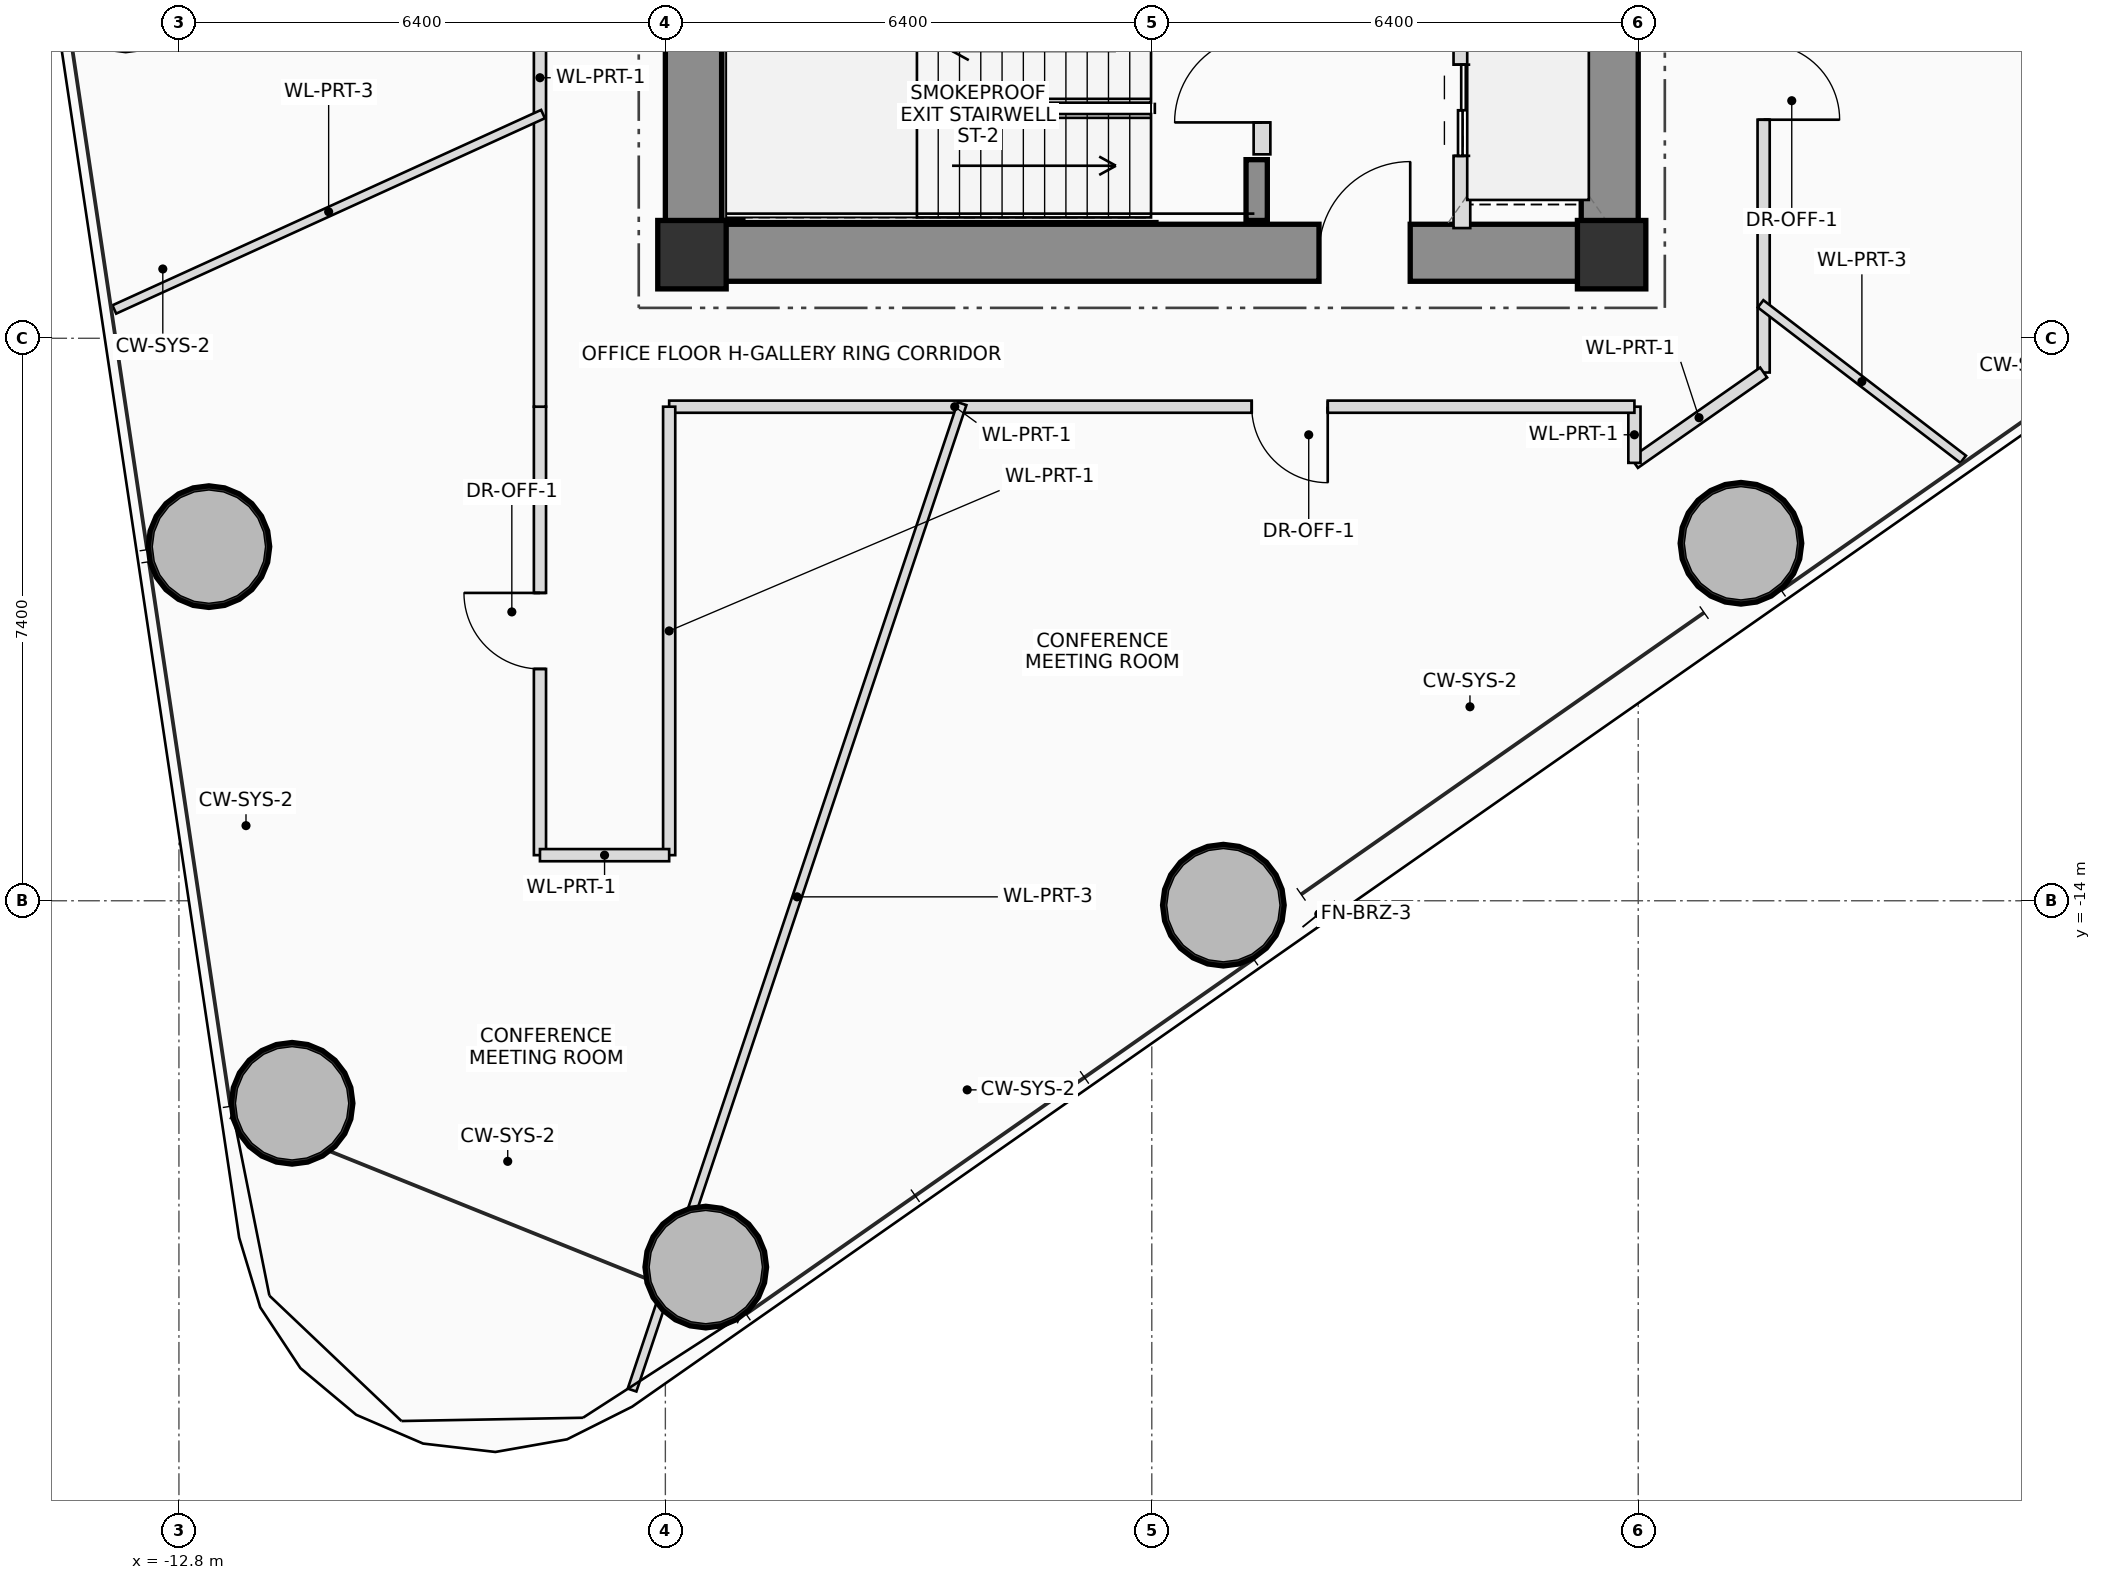
"""IFC4 building model, lengths in metres.
Left out: names, types, materials, properties, quantities, classifications, styles, units other than length and angle.
Written with IfcOpenShell. Run it as: python <this file> out.ifc"""

import sys

from ifc_helpers import new_model, si_unit, direction, frame, frame_2d, origin, origin_2d, place, context, subcontext, project, spatial, rectangle, hollow_circle, extrude, source, transform, mapped, element, fill, save


model = new_model("IFC4")
c1 = context("Model", 3, precision=1e-05, world=origin(), true_north=direction((0.0, 1.0)))
c2 = subcontext(c1, "Body", "Model", "MODEL_VIEW")
j1 = project(units=[si_unit("LENGTHUNIT", "METRE"), si_unit("PLANEANGLEUNIT", "RADIAN")], contexts=[c1])
p1 = place(None, origin())
s1 = spatial("IfcSite", under=j1, at=p1, CompositionType="ELEMENT")
p2 = place(p1, origin())
s2 = spatial("IfcBuilding", under=s1, at=p2, CompositionType="ELEMENT")
p3 = place(p2, frame((0.0, 0.0, 62.3)))
s3 = spatial("IfcBuildingStorey", under=s2, at=p3, CompositionType="ELEMENT", Elevation=62.3)
m1 = source(origin(), c2, "Body", "SweptSolid", [
    extrude(rectangle(XDim=0.9, YDim=0.9, at=origin_2d()), origin(), (0.0, 0.0, 1.0), 3.75),
])
for number, where, z_axis, x_axis in (
    (1, (-6.05, -5.5, 0.0), (0.0, 0.0, 1.0), (1.0, 0.0, 0.0)),
    (2, (6.05, -5.5, 0.0), (0.0, 0.0, 1.0), (1.0, 0.0, 0.0)),
):
    element("IfcColumn", number, at=place(p3, frame(where, z_axis=z_axis, x_axis=x_axis)), inside=s3, PredefinedType="COLUMN", context=c2, shape_type="MappedRepresentation", body=[
        mapped(m1, transform((0.0, 0.0, 0.0), scale=1.0)),
    ])
p4 = place(p3, frame((-6.4, -5.475, 0.0), z_axis=(0.0, 0.0, 1.0), x_axis=(1.0, 0.0, 0.0)))
e3 = element("IfcWall", 3, at=p4, inside=s3, PredefinedType="SHEAR", context=c2, shape_type="SweptSolid", body=[
    extrude(rectangle(XDim=12.8, YDim=0.75, at=frame_2d((6.4, 0.0))), origin(), (0.0, 0.0, 1.0), 3.75),
])
p5 = place(p4, frame((8.6, 0.0, 0.0)))
e4 = element("IfcOpeningElement", 4, at=p5, cuts=e3, PredefinedType="OPENING", context=c2, shape_type="SweptSolid", body=[
    extrude(rectangle(XDim=1.2, YDim=2.2, at=frame_2d((0.6, 1.1))), frame((0.0, 0.385, 0.0), z_axis=(0.0, -1.0, 0.0), x_axis=(1.0, 0.0, 0.0)), (0.0, 0.0, 1.0), 0.77),
])
p6 = place(p3, frame((6.025, -5.1, 0.0), z_axis=(0.0, 0.0, 1.0), x_axis=(0.0, 1.0, 0.0)))
e5 = element("IfcWall", 5, at=p6, inside=s3, PredefinedType="SHEAR", context=c2, shape_type="SweptSolid", body=[
    extrude(rectangle(XDim=10.2, YDim=0.75, at=frame_2d((5.1, 0.0))), origin(), (0.0, 0.0, 1.0), 3.75),
])
p7 = place(p3, frame((-6.025, -5.1, 0.0), z_axis=(0.0, 0.0, 1.0), x_axis=(0.0, 1.0, 0.0)))
e6 = element("IfcWall", 6, at=p7, inside=s3, PredefinedType="SHEAR", context=c2, shape_type="SweptSolid", body=[
    extrude(rectangle(XDim=3.35, YDim=0.75, at=frame_2d((1.675, 0.0))), origin(), (0.0, 0.0, 1.0), 3.75),
])
p8 = place(p3, frame((-5.52, -5.05, 0.0), z_axis=(0.0, 0.0, 1.0), x_axis=(0.0, 1.0, 0.0)))
e7 = element("IfcWall", 7, at=p8, inside=s3, PredefinedType="SHEAR", context=c2, shape_type="SweptSolid", body=[
    extrude(rectangle(XDim=2.75, YDim=0.28, at=frame_2d((1.375, 0.0))), origin(), (0.0, 0.0, 1.0), 3.75),
])
p9 = place(p3, frame((1.38, -5.05, 0.0), z_axis=(0.0, 0.0, 1.0), x_axis=(0.0, 1.0, 0.0)))
e8 = element("IfcWall", 8, at=p9, inside=s3, PredefinedType="SHEAR", context=c2, shape_type="SweptSolid", body=[
    extrude(rectangle(XDim=0.8, YDim=0.28, at=frame_2d((0.4, 0.0))), origin(), (0.0, 0.0, 1.0), 3.75),
])
m2 = source(origin(), c2, "Body", "SweptSolid", [
    extrude(hollow_circle(Radius=0.8, WallThickness=0.055, at=origin_2d()), origin(), (0.0, 0.0, 1.0), 3.75),
])
for number, where, z_axis, x_axis in (
    (9, (-5.868, -18.819, 0.0), (0.0, 0.0, 1.0), (1.0, 0.0, 0.0)),
    (10, (0.942, -14.058, 0.0), (0.0, 0.0, 1.0), (1.0, 0.0, 0.0)),
    (11, (7.752, -9.297, 0.0), (0.0, 0.0, 1.0), (1.0, 0.0, 0.0)),
    (12, (-12.406, -9.341, 0.0), (0.0, 0.0, 1.0), (1.0, 0.0, 0.0)),
    (13, (-11.311, -16.665, 0.0), (0.0, 0.0, 1.0), (1.0, 0.0, 0.0)),
):
    element("IfcColumn", number, at=place(p3, frame(where, z_axis=z_axis, x_axis=x_axis)), inside=s3, PredefinedType="COLUMN", context=c2, shape_type="MappedRepresentation", body=[
        mapped(m2, transform((0.0, 0.0, 0.0), scale=1.0)),
    ])
p10 = place(p3, frame((1.45, -4.18, 0.0), z_axis=(0.0, 0.0, 1.0), x_axis=(0.0, 1.0, 0.0)))
e14 = element("IfcWall", 14, at=p10, inside=s3, PredefinedType="PLUMBINGWALL", context=c2, shape_type="SweptSolid", body=[
    extrude(rectangle(XDim=1.98, YDim=0.22, at=frame_2d((0.99, 0.0))), origin(), (0.0, 0.0, 1.0), 3.545),
])
p11 = place(p10, frame((0.42, 0.0, 0.0)))
e15 = element("IfcOpeningElement", 15, at=p11, cuts=e14, PredefinedType="OPENING", context=c2, shape_type="SweptSolid", body=[
    extrude(rectangle(XDim=1.15, YDim=2.15, at=frame_2d((0.575, 1.075))), frame((0.0, 0.12, 0.0), z_axis=(0.0, -1.0, 0.0), x_axis=(1.0, 0.0, 0.0)), (0.0, 0.0, 1.0), 0.24),
])
p12 = place(p3, frame((4.08, -5.15, 0.0), z_axis=(0.0, 0.0, 1.0), x_axis=(0.0, 1.0, 0.0)))
e16 = element("IfcWall", 16, at=p12, inside=s3, PredefinedType="PLUMBINGWALL", context=c2, shape_type="SweptSolid", body=[
    extrude(rectangle(XDim=2.95, YDim=0.22, at=frame_2d((1.475, 0.0))), origin(), (0.0, 0.0, 1.0), 3.545),
])
p13 = place(p12, frame((0.95, 0.0, 0.0)))
e17 = element("IfcOpeningElement", 17, at=p13, cuts=e16, PredefinedType="OPENING", context=c2, shape_type="SweptSolid", body=[
    extrude(rectangle(XDim=1.2, YDim=2.25, at=frame_2d((0.6, 1.125))), frame((0.0, 0.12, 0.0), z_axis=(0.0, -1.0, 0.0), x_axis=(1.0, 0.0, 0.0)), (0.0, 0.0, 1.0), 0.24),
])
p14 = place(p3, frame((-8.05, -13.4, 0.0), z_axis=(0.0, 0.0, 1.0), x_axis=(0.0, 1.0, 0.0)))
e18 = element("IfcWall", 18, at=p14, inside=s3, PredefinedType="PARTITIONING", context=c2, shape_type="SweptSolid", body=[
    extrude(rectangle(XDim=5.9, YDim=0.16, at=frame_2d((2.95, 0.0))), origin(), (0.0, 0.0, 1.0), 2.85),
])
p15 = place(p14, frame((2.45, 0.0, 0.0)))
e19 = element("IfcOpeningElement", 19, at=p15, cuts=e18, PredefinedType="OPENING", context=c2, shape_type="SweptSolid", body=[
    extrude(rectangle(XDim=1.0, YDim=2.25, at=frame_2d((0.5, 1.125))), frame((0.0, 0.09, 0.0), z_axis=(0.0, -1.0, 0.0), x_axis=(1.0, 0.0, 0.0)), (0.0, 0.0, 1.0), 0.18),
])
p16 = place(p3, frame((-8.05, -7.5, 0.0), z_axis=(0.0, 0.0, 1.0), x_axis=(0.0, 1.0, 0.0)))
e20 = element("IfcWall", 20, at=p16, inside=s3, PredefinedType="PARTITIONING", context=c2, shape_type="SweptSolid", body=[
    extrude(rectangle(XDim=15.0, YDim=0.16, at=frame_2d((7.5, 0.0))), origin(), (0.0, 0.0, 1.0), 2.85),
])
p17 = place(p16, frame((8.806, 0.0, 0.0)))
e21 = element("IfcOpeningElement", 21, at=p17, cuts=e20, PredefinedType="OPENING", context=c2, shape_type="SweptSolid", body=[
    extrude(rectangle(XDim=1.0, YDim=2.25, at=frame_2d((0.5, 1.125))), frame((0.0, 0.09, 0.0), z_axis=(0.0, -1.0, 0.0), x_axis=(1.0, 0.0, 0.0)), (0.0, 0.0, 1.0), 0.18),
])
p18 = place(p3, frame((8.05, -0.02, 0.0), z_axis=(0.0, 0.0, 1.0), x_axis=(0.0, -1.0, 0.0)))
e22 = element("IfcWall", 22, at=p18, inside=s3, PredefinedType="PARTITIONING", context=c2, shape_type="SweptSolid", body=[
    extrude(rectangle(XDim=7.03, YDim=0.16, at=frame_2d((3.515, 0.0))), origin(), (0.0, 0.0, 1.0), 2.85),
])
p19 = place(p18, frame((2.705, 0.0, 0.0)))
e23 = element("IfcOpeningElement", 23, at=p19, cuts=e22, PredefinedType="OPENING", context=c2, shape_type="SweptSolid", body=[
    extrude(rectangle(XDim=1.0, YDim=2.25, at=frame_2d((0.5, 1.125))), frame((0.0, 0.09, 0.0), z_axis=(0.0, -1.0, 0.0), x_axis=(1.0, 0.0, 0.0)), (0.0, 0.0, 1.0), 0.18),
])
p20 = place(p3, frame((8.05, -7.05, 0.0), z_axis=(0.0, 0.0, 1.0), x_axis=(-0.819513816746, -0.573059424635, 0.0)))
e24 = element("IfcWall", 24, at=p20, inside=s3, PredefinedType="PARTITIONING", context=c2, shape_type="SweptSolid", body=[
    extrude(rectangle(XDim=2.074, YDim=0.16, at=frame_2d((1.037, 0.0))), origin(), (0.0, 0.0, 1.0), 2.85),
])
p21 = place(p3, frame((6.35, -8.239, 0.0), z_axis=(0.0, 0.0, 1.0), x_axis=(0.0, 1.0, 0.0)))
e25 = element("IfcWall", 25, at=p21, inside=s3, PredefinedType="PARTITIONING", context=c2, shape_type="SweptSolid", body=[
    extrude(rectangle(XDim=0.739, YDim=0.16, at=frame_2d((0.37, 0.0))), origin(), (0.0, 0.0, 1.0), 3.545),
])
p22 = place(p3, frame((6.35, -7.5, 0.0), z_axis=(0.0, 0.0, 1.0), x_axis=(-1.0, 0.0, 0.0)))
e26 = element("IfcWall", 26, at=p22, inside=s3, PredefinedType="PARTITIONING", context=c2, shape_type="SweptSolid", body=[
    extrude(rectangle(XDim=12.7, YDim=0.16, at=frame_2d((6.35, 0.0))), origin(), (0.0, 0.0, 1.0), 2.85),
])
p23 = place(p22, frame((4.035, 0.0, 0.0)))
e27 = element("IfcOpeningElement", 27, at=p23, cuts=e26, PredefinedType="OPENING", context=c2, shape_type="SweptSolid", body=[
    extrude(rectangle(XDim=1.0, YDim=2.25, at=frame_2d((0.5, 1.125))), frame((0.0, 0.09, 0.0), z_axis=(0.0, -1.0, 0.0), x_axis=(1.0, 0.0, 0.0)), (0.0, 0.0, 1.0), 0.18),
])
p24 = place(p3, frame((-6.35, -7.5, 0.0), z_axis=(0.0, 0.0, 1.0), x_axis=(0.0, -1.0, 0.0)))
e28 = element("IfcWall", 28, at=p24, inside=s3, PredefinedType="PARTITIONING", context=c2, shape_type="SweptSolid", body=[
    extrude(rectangle(XDim=5.9, YDim=0.16, at=frame_2d((2.95, 0.0))), origin(), (0.0, 0.0, 1.0), 3.05),
])
p25 = place(p3, frame((-6.35, -13.4, 0.0), z_axis=(0.0, 0.0, 1.0), x_axis=(-1.0, 0.0, 0.0)))
e29 = element("IfcWall", 29, at=p25, inside=s3, PredefinedType="PARTITIONING", context=c2, shape_type="SweptSolid", body=[
    extrude(rectangle(XDim=1.7, YDim=0.16, at=frame_2d((0.85, 0.0))), origin(), (0.0, 0.0, 1.0), 3.545),
])
p26 = place(p3, frame((-8.01, -3.65, 0.0), z_axis=(0.0, 0.0, 1.0), x_axis=(-0.909955974898, -0.414704863425, 0.0)))
e30 = element("IfcWall", 30, at=p26, inside=s3, PredefinedType="PARTITIONING", context=c2, shape_type="SweptSolid", body=[
    extrude(rectangle(XDim=6.198, YDim=0.12, at=frame_2d((3.099, 0.0))), origin(), (0.0, 0.0, 1.0), 2.85),
])
p27 = place(p3, frame((-2.496, -7.46, 0.0), z_axis=(0.0, 0.0, 1.0), x_axis=(-0.317303379034, -0.948324082608, 0.0)))
e31 = element("IfcWall", 31, at=p27, inside=s3, PredefinedType="PARTITIONING", context=c2, shape_type="SweptSolid", body=[
    extrude(rectangle(XDim=13.684, YDim=0.12, at=frame_2d((6.842, 0.0))), origin(), (0.0, 0.0, 1.0), 2.85),
])
p28 = place(p3, frame((8.01, -6.146, 0.0), z_axis=(0.0, 0.0, 1.0), x_axis=(0.79333380799, -0.608786883153, 0.0)))
e32 = element("IfcWall", 32, at=p28, inside=s3, PredefinedType="PARTITIONING", context=c2, shape_type="SweptSolid", body=[
    extrude(rectangle(XDim=3.36, YDim=0.12, at=frame_2d((1.68, 0.0))), origin(), (0.0, 0.0, 1.0), 3.01),
])
p29 = place(p5, origin())
e33 = element("IfcDoor", 33, at=p29, inside=s3, OperationType="SINGLE_SWING_RIGHT", PredefinedType="DOOR", context=c2, shape_type="SweptSolid", body=[
    extrude(rectangle(XDim=1.2, YDim=2.2, at=frame_2d((0.6, 1.1))), frame((0.0, 0.025, 0.0), z_axis=(0.0, -1.0, 0.0), x_axis=(1.0, 0.0, 0.0)), (0.0, 0.0, 1.0), 0.05),
])
fill(e4, e33)
p30 = place(p11, origin())
e34 = element("IfcDoor", 34, at=p30, inside=s3, OperationType="SINGLE_SWING_LEFT", PredefinedType="DOOR", context=c2, shape_type="SweptSolid", body=[
    extrude(rectangle(XDim=1.15, YDim=2.15, at=frame_2d((0.575, 1.075))), frame((0.0, 0.025, 0.0), z_axis=(0.0, -1.0, 0.0), x_axis=(1.0, 0.0, 0.0)), (0.0, 0.0, 1.0), 0.05),
])
fill(e15, e34)
p31 = place(p13, origin())
e35 = element("IfcDoor", 35, at=p31, inside=s3, OperationType="DOUBLE_DOOR_SLIDING", PredefinedType="DOOR", context=c2, shape_type="SweptSolid", body=[
    extrude(rectangle(XDim=1.2, YDim=2.25, at=frame_2d((0.6, 1.125))), frame((0.0, 0.025, 0.0), z_axis=(0.0, -1.0, 0.0), x_axis=(1.0, 0.0, 0.0)), (0.0, 0.0, 1.0), 0.05),
])
fill(e17, e35)
p32 = place(p15, origin())
e36 = element("IfcDoor", 36, at=p32, inside=s3, OperationType="SINGLE_SWING_RIGHT", PredefinedType="DOOR", context=c2, shape_type="SweptSolid", body=[
    extrude(rectangle(XDim=1.0, YDim=2.25, at=frame_2d((0.5, 1.125))), frame((0.0, 0.025, 0.0), z_axis=(0.0, -1.0, 0.0), x_axis=(1.0, 0.0, 0.0)), (0.0, 0.0, 1.0), 0.05),
])
fill(e19, e36)
p33 = place(p19, origin())
e37 = element("IfcDoor", 37, at=p33, inside=s3, OperationType="SINGLE_SWING_RIGHT", PredefinedType="DOOR", context=c2, shape_type="SweptSolid", body=[
    extrude(rectangle(XDim=1.0, YDim=2.25, at=frame_2d((0.5, 1.125))), frame((0.0, 0.025, 0.0), z_axis=(0.0, -1.0, 0.0), x_axis=(1.0, 0.0, 0.0)), (0.0, 0.0, 1.0), 0.05),
])
fill(e23, e37)
p34 = place(p23, origin())
e38 = element("IfcDoor", 38, at=p34, inside=s3, OperationType="SINGLE_SWING_LEFT", PredefinedType="DOOR", context=c2, shape_type="SweptSolid", body=[
    extrude(rectangle(XDim=1.0, YDim=2.25, at=frame_2d((0.5, 1.125))), frame((0.0, 0.025, 0.0), z_axis=(0.0, -1.0, 0.0), x_axis=(1.0, 0.0, 0.0)), (0.0, 0.0, 1.0), 0.05),
])
fill(e27, e38)
save(model, sys.argv[1])
